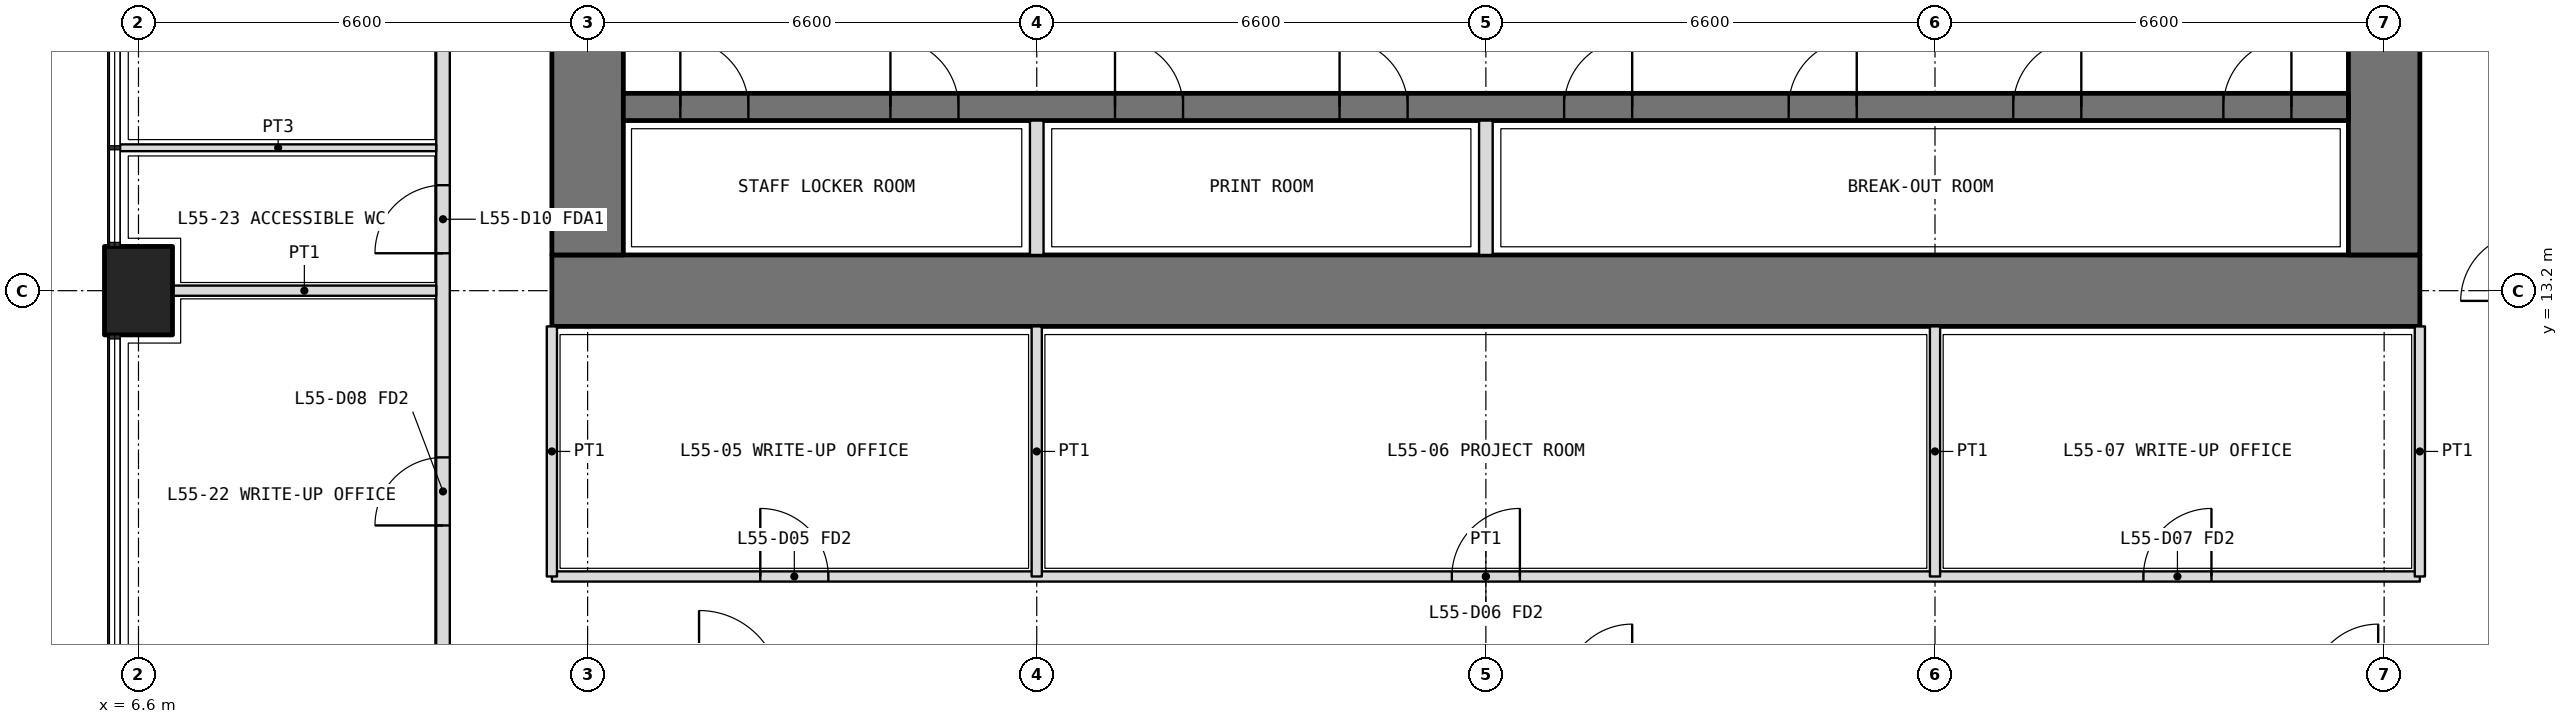
"""IFC4 building model, lengths in metres.
Left out: names, types, materials, properties, quantities, classifications, styles, units other than length and angle.
Written with IfcOpenShell. Run it as: python <this file> out.ifc"""

import sys

from ifc_helpers import new_model, si_unit, direction, frame, frame_2d, origin, origin_2d, place, context, subcontext, project, spatial, rectangle, extrude, element, fill, save


model = new_model("IFC4")
c1 = context("Model", 3, precision=1e-05, world=origin(), true_north=direction((0.0, 1.0)))
c2 = subcontext(c1, "Body", "Model", "MODEL_VIEW")
j1 = project(units=[si_unit("LENGTHUNIT", "METRE"), si_unit("PLANEANGLEUNIT", "RADIAN")], contexts=[c1])
p1 = place(None, origin())
s1 = spatial("IfcSite", under=j1, at=p1, CompositionType="ELEMENT")
p2 = place(p1, origin())
s2 = spatial("IfcBuilding", under=s1, at=p2, CompositionType="ELEMENT")
p3 = place(p2, frame((0.0, 0.0, 241.8)))
s3 = spatial("IfcBuildingStorey", under=s2, at=p3, CompositionType="ELEMENT", Elevation=241.8)
p4 = place(p3, frame((6.6, 13.2, 0.0), z_axis=(0.0, 0.0, 1.0), x_axis=(0.0, 1.0, 0.0)))
e1 = element("IfcColumn", 1, at=p4, inside=s3, PredefinedType="COLUMN", context=c2, shape_type="SweptSolid", body=[
    extrude(rectangle(XDim=1.3, YDim=1.0, at=origin_2d()), origin(), (0.0, 0.0, 1.0), 4.2),
])
p5 = place(p3, frame((12.675, 13.2, 0.0), z_axis=(0.0, 0.0, 1.0), x_axis=(1.0, 0.0, 0.0)))
e2 = element("IfcWall", 2, at=p5, inside=s3, PredefinedType="SHEAR", context=c2, shape_type="SweptSolid", body=[
    extrude(rectangle(XDim=27.45, YDim=1.05, at=frame_2d((13.725, 0.0))), origin(), (0.0, 0.0, 1.0), 4.2),
])
p6 = place(p3, frame((39.6, 13.725, 0.0), z_axis=(0.0, 0.0, 1.0), x_axis=(0.0, 1.0, 0.0)))
e3 = element("IfcWall", 3, at=p6, inside=s3, PredefinedType="SHEAR", context=c2, shape_type="SweptSolid", body=[
    extrude(rectangle(XDim=18.75, YDim=1.05, at=frame_2d((9.375, 0.0))), origin(), (0.0, 0.0, 1.0), 4.2),
])
p7 = place(p6, frame((3.025, 0.0, 0.0)))
e4 = element("IfcOpeningElement", 4, at=p7, cuts=e3, PredefinedType="OPENING", context=c2, shape_type="SweptSolid", body=[
    extrude(rectangle(XDim=1.6, YDim=2.1, at=frame_2d((0.8, 1.05))), frame((0.0, 0.535, 0.0), z_axis=(0.0, -1.0, 0.0), x_axis=(1.0, 0.0, 0.0)), (0.0, 0.0, 1.0), 1.07),
])
p8 = place(p6, frame((13.825, 0.0, 0.0)))
e5 = element("IfcOpeningElement", 5, at=p8, cuts=e3, PredefinedType="OPENING", context=c2, shape_type="SweptSolid", body=[
    extrude(rectangle(XDim=1.6, YDim=2.1, at=frame_2d((0.8, 1.05))), frame((0.0, 0.535, 0.0), z_axis=(0.0, -1.0, 0.0), x_axis=(1.0, 0.0, 0.0)), (0.0, 0.0, 1.0), 1.07),
])
p9 = place(p3, frame((13.2, 32.475, 0.0), z_axis=(0.0, 0.0, 1.0), x_axis=(0.0, -1.0, 0.0)))
e6 = element("IfcWall", 6, at=p9, inside=s3, PredefinedType="SHEAR", context=c2, shape_type="SweptSolid", body=[
    extrude(rectangle(XDim=18.75, YDim=1.05, at=frame_2d((9.375, 0.0))), origin(), (0.0, 0.0, 1.0), 4.2),
])
p10 = place(p9, frame((14.125, 0.0, 0.0)))
e7 = element("IfcOpeningElement", 7, at=p10, cuts=e6, PredefinedType="OPENING", context=c2, shape_type="SweptSolid", body=[
    extrude(rectangle(XDim=1.6, YDim=2.1, at=frame_2d((0.8, 1.05))), frame((0.0, 0.535, 0.0), z_axis=(0.0, -1.0, 0.0), x_axis=(1.0, 0.0, 0.0)), (0.0, 0.0, 1.0), 1.07),
])
p11 = place(p9, frame((3.325, 0.0, 0.0)))
e8 = element("IfcOpeningElement", 8, at=p11, cuts=e6, PredefinedType="OPENING", context=c2, shape_type="SweptSolid", body=[
    extrude(rectangle(XDim=1.6, YDim=2.1, at=frame_2d((0.8, 1.05))), frame((0.0, 0.535, 0.0), z_axis=(0.0, -1.0, 0.0), x_axis=(1.0, 0.0, 0.0)), (0.0, 0.0, 1.0), 1.07),
])
p12 = place(p3, frame((13.725, 15.9, 0.0), z_axis=(0.0, 0.0, 1.0), x_axis=(1.0, 0.0, 0.0)))
e9 = element("IfcWall", 9, at=p12, inside=s3, PredefinedType="SHEAR", context=c2, shape_type="SweptSolid", body=[
    extrude(rectangle(XDim=25.35, YDim=0.4, at=frame_2d((12.675, 0.0))), origin(), (0.0, 0.0, 1.0), 4.2),
])
p13 = place(p12, frame((0.837, 0.0, 0.0)))
e10 = element("IfcOpeningElement", 10, at=p13, cuts=e9, PredefinedType="OPENING", context=c2, shape_type="SweptSolid", body=[
    extrude(rectangle(XDim=1.0, YDim=2.1, at=frame_2d((0.5, 1.05))), frame((0.0, 0.21, 0.0), z_axis=(0.0, -1.0, 0.0), x_axis=(1.0, 0.0, 0.0)), (0.0, 0.0, 1.0), 0.42),
])
p14 = place(p12, frame((3.925, 0.0, 0.0)))
e11 = element("IfcOpeningElement", 11, at=p14, cuts=e9, PredefinedType="OPENING", context=c2, shape_type="SweptSolid", body=[
    extrude(rectangle(XDim=1.0, YDim=2.1, at=frame_2d((0.5, 1.05))), frame((0.0, 0.21, 0.0), z_axis=(0.0, -1.0, 0.0), x_axis=(1.0, 0.0, 0.0)), (0.0, 0.0, 1.0), 0.42),
])
p15 = place(p12, frame((7.225, 0.0, 0.0)))
e12 = element("IfcOpeningElement", 12, at=p15, cuts=e9, PredefinedType="OPENING", context=c2, shape_type="SweptSolid", body=[
    extrude(rectangle(XDim=1.0, YDim=2.1, at=frame_2d((0.5, 1.05))), frame((0.0, 0.21, 0.0), z_axis=(0.0, -1.0, 0.0), x_axis=(1.0, 0.0, 0.0)), (0.0, 0.0, 1.0), 0.42),
])
p16 = place(p12, frame((10.525, 0.0, 0.0)))
e13 = element("IfcOpeningElement", 13, at=p16, cuts=e9, PredefinedType="OPENING", context=c2, shape_type="SweptSolid", body=[
    extrude(rectangle(XDim=1.0, YDim=2.1, at=frame_2d((0.5, 1.05))), frame((0.0, 0.21, 0.0), z_axis=(0.0, -1.0, 0.0), x_axis=(1.0, 0.0, 0.0)), (0.0, 0.0, 1.0), 0.42),
])
p17 = place(p12, frame((13.825, 0.0, 0.0)))
e14 = element("IfcOpeningElement", 14, at=p17, cuts=e9, PredefinedType="OPENING", context=c2, shape_type="SweptSolid", body=[
    extrude(rectangle(XDim=1.0, YDim=2.1, at=frame_2d((0.5, 1.05))), frame((0.0, 0.21, 0.0), z_axis=(0.0, -1.0, 0.0), x_axis=(1.0, 0.0, 0.0)), (0.0, 0.0, 1.0), 0.42),
])
p18 = place(p12, frame((17.125, 0.0, 0.0)))
e15 = element("IfcOpeningElement", 15, at=p18, cuts=e9, PredefinedType="OPENING", context=c2, shape_type="SweptSolid", body=[
    extrude(rectangle(XDim=1.0, YDim=2.1, at=frame_2d((0.5, 1.05))), frame((0.0, 0.21, 0.0), z_axis=(0.0, -1.0, 0.0), x_axis=(1.0, 0.0, 0.0)), (0.0, 0.0, 1.0), 0.42),
])
p19 = place(p12, frame((20.425, 0.0, 0.0)))
e16 = element("IfcOpeningElement", 16, at=p19, cuts=e9, PredefinedType="OPENING", context=c2, shape_type="SweptSolid", body=[
    extrude(rectangle(XDim=1.0, YDim=2.1, at=frame_2d((0.5, 1.05))), frame((0.0, 0.21, 0.0), z_axis=(0.0, -1.0, 0.0), x_axis=(1.0, 0.0, 0.0)), (0.0, 0.0, 1.0), 0.42),
])
p20 = place(p12, frame((23.512, 0.0, 0.0)))
e17 = element("IfcOpeningElement", 17, at=p20, cuts=e9, PredefinedType="OPENING", context=c2, shape_type="SweptSolid", body=[
    extrude(rectangle(XDim=1.0, YDim=2.1, at=frame_2d((0.5, 1.05))), frame((0.0, 0.21, 0.0), z_axis=(0.0, -1.0, 0.0), x_axis=(1.0, 0.0, 0.0)), (0.0, 0.0, 1.0), 0.42),
])
for number, where, z_axis, x_axis in (
    (18, (19.8, 13.725, 0.0), (0.0, 0.0, 1.0), (0.0, 1.0, 0.0)),
    (19, (26.4, 13.725, 0.0), (0.0, 0.0, 1.0), (0.0, 1.0, 0.0)),
):
    element("IfcWall", number, at=place(p3, frame(where, z_axis=z_axis, x_axis=x_axis)), inside=s3, PredefinedType="PARTITIONING", context=c2, shape_type="SweptSolid", body=[
        extrude(rectangle(XDim=1.975, YDim=0.2, at=frame_2d((0.987, 0.0))), origin(), (0.0, 0.0, 1.0), 4.2),
    ])
p21 = place(p3, frame((12.675, 9.0, 0.0), z_axis=(0.0, 0.0, 1.0), x_axis=(1.0, 0.0, 0.0)))
e20 = element("IfcWall", 20, at=p21, inside=s3, PredefinedType="PARTITIONING", context=c2, shape_type="SweptSolid", body=[
    extrude(rectangle(XDim=27.45, YDim=0.15, at=frame_2d((13.725, 0.0))), origin(), (0.0, 0.0, 1.0), 3.0),
])
p22 = place(p21, frame((3.062, 0.0, 0.0)))
e21 = element("IfcOpeningElement", 21, at=p22, cuts=e20, PredefinedType="OPENING", context=c2, shape_type="SweptSolid", body=[
    extrude(rectangle(XDim=1.0, YDim=2.1, at=frame_2d((0.5, 1.05))), frame((0.0, 0.085, 0.0), z_axis=(0.0, -1.0, 0.0), x_axis=(1.0, 0.0, 0.0)), (0.0, 0.0, 1.0), 0.17),
])
p23 = place(p21, frame((13.225, 0.0, 0.0)))
e22 = element("IfcOpeningElement", 22, at=p23, cuts=e20, PredefinedType="OPENING", context=c2, shape_type="SweptSolid", body=[
    extrude(rectangle(XDim=1.0, YDim=2.1, at=frame_2d((0.5, 1.05))), frame((0.0, 0.085, 0.0), z_axis=(0.0, -1.0, 0.0), x_axis=(1.0, 0.0, 0.0)), (0.0, 0.0, 1.0), 0.17),
])
p24 = place(p21, frame((23.387, 0.0, 0.0)))
e23 = element("IfcOpeningElement", 23, at=p24, cuts=e20, PredefinedType="OPENING", context=c2, shape_type="SweptSolid", body=[
    extrude(rectangle(XDim=1.0, YDim=2.1, at=frame_2d((0.5, 1.05))), frame((0.0, 0.085, 0.0), z_axis=(0.0, -1.0, 0.0), x_axis=(1.0, 0.0, 0.0)), (0.0, 0.0, 1.0), 0.17),
])
for number, where, z_axis, x_axis in (
    (24, (12.675, 12.675, 0.0), (0.0, 0.0, 1.0), (0.0, -1.0, 0.0)),
    (25, (40.125, 12.675, 0.0), (0.0, 0.0, 1.0), (0.0, -1.0, 0.0)),
    (26, (19.8, 12.675, 0.0), (0.0, 0.0, 1.0), (0.0, -1.0, 0.0)),
    (27, (33.0, 12.675, 0.0), (0.0, 0.0, 1.0), (0.0, -1.0, 0.0)),
):
    element("IfcWall", number, at=place(p3, frame(where, z_axis=z_axis, x_axis=x_axis)), inside=s3, PredefinedType="PARTITIONING", context=c2, shape_type="SweptSolid", body=[
        extrude(rectangle(XDim=3.675, YDim=0.15, at=frame_2d((1.837, 0.0))), origin(), (0.0, 0.0, 1.0), 3.0),
    ])
p25 = place(p3, frame((11.075, 7.4, 0.0), z_axis=(0.0, 0.0, 1.0), x_axis=(0.0, 1.0, 0.0)))
e28 = element("IfcWall", 28, at=p25, inside=s3, PredefinedType="PARTITIONING", context=c2, shape_type="SweptSolid", body=[
    extrude(rectangle(XDim=31.4, YDim=0.2, at=frame_2d((15.7, 0.0))), origin(), (0.0, 0.0, 1.0), 3.0),
])
p26 = place(p25, frame((2.35, 0.0, 0.0)))
e29 = element("IfcOpeningElement", 29, at=p26, cuts=e28, PredefinedType="OPENING", context=c2, shape_type="SweptSolid", body=[
    extrude(rectangle(XDim=1.0, YDim=2.1, at=frame_2d((0.5, 1.05))), frame((0.0, 0.11, 0.0), z_axis=(0.0, -1.0, 0.0), x_axis=(1.0, 0.0, 0.0)), (0.0, 0.0, 1.0), 0.22),
])
p27 = place(p25, frame((6.35, 0.0, 0.0)))
e30 = element("IfcOpeningElement", 30, at=p27, cuts=e28, PredefinedType="OPENING", context=c2, shape_type="SweptSolid", body=[
    extrude(rectangle(XDim=1.0, YDim=2.1, at=frame_2d((0.5, 1.05))), frame((0.0, 0.11, 0.0), z_axis=(0.0, -1.0, 0.0), x_axis=(1.0, 0.0, 0.0)), (0.0, 0.0, 1.0), 0.22),
])
p28 = place(p25, frame((9.45, 0.0, 0.0)))
e31 = element("IfcOpeningElement", 31, at=p28, cuts=e28, PredefinedType="OPENING", context=c2, shape_type="SweptSolid", body=[
    extrude(rectangle(XDim=0.9, YDim=2.1, at=frame_2d((0.45, 1.05))), frame((0.0, 0.11, 0.0), z_axis=(0.0, -1.0, 0.0), x_axis=(1.0, 0.0, 0.0)), (0.0, 0.0, 1.0), 0.22),
])
p29 = place(p25, frame((13.35, 0.0, 0.0)))
e32 = element("IfcOpeningElement", 32, at=p29, cuts=e28, PredefinedType="OPENING", context=c2, shape_type="SweptSolid", body=[
    extrude(rectangle(XDim=0.9, YDim=2.1, at=frame_2d((0.45, 1.05))), frame((0.0, 0.11, 0.0), z_axis=(0.0, -1.0, 0.0), x_axis=(1.0, 0.0, 0.0)), (0.0, 0.0, 1.0), 0.22),
])
p30 = place(p25, frame((20.15, 0.0, 0.0)))
e33 = element("IfcOpeningElement", 33, at=p30, cuts=e28, PredefinedType="OPENING", context=c2, shape_type="SweptSolid", body=[
    extrude(rectangle(XDim=1.0, YDim=2.1, at=frame_2d((0.5, 1.05))), frame((0.0, 0.11, 0.0), z_axis=(0.0, -1.0, 0.0), x_axis=(1.0, 0.0, 0.0)), (0.0, 0.0, 1.0), 0.22),
])
p31 = place(p25, frame((28.05, 0.0, 0.0)))
e34 = element("IfcOpeningElement", 34, at=p31, cuts=e28, PredefinedType="OPENING", context=c2, shape_type="SweptSolid", body=[
    extrude(rectangle(XDim=1.0, YDim=2.1, at=frame_2d((0.5, 1.05))), frame((0.0, 0.11, 0.0), z_axis=(0.0, -1.0, 0.0), x_axis=(1.0, 0.0, 0.0)), (0.0, 0.0, 1.0), 0.22),
])
p32 = place(p3, frame((6.33, 15.3, 0.0), z_axis=(0.0, 0.0, 1.0), x_axis=(1.0, 0.0, 0.0)))
e35 = element("IfcWall", 35, at=p32, inside=s3, PredefinedType="PARTITIONING", context=c2, shape_type="SweptSolid", body=[
    extrude(rectangle(XDim=4.645, YDim=0.1, at=frame_2d((2.323, 0.0))), origin(), (0.0, 0.0, 1.0), 2.7),
])
p33 = place(p3, frame((7.1, 13.2, 0.0), z_axis=(0.0, 0.0, 1.0), x_axis=(1.0, 0.0, 0.0)))
e36 = element("IfcWall", 36, at=p33, inside=s3, PredefinedType="PARTITIONING", context=c2, shape_type="SweptSolid", body=[
    extrude(rectangle(XDim=3.875, YDim=0.15, at=frame_2d((1.938, 0.0))), origin(), (0.0, 0.0, 1.0), 3.0),
])
p34 = place(p22, origin())
e37 = element("IfcDoor", 37, at=p34, inside=s3, OperationType="SINGLE_SWING_LEFT", PredefinedType="DOOR", context=c2, shape_type="SweptSolid", body=[
    extrude(rectangle(XDim=1.0, YDim=2.1, at=frame_2d((0.5, 1.05))), frame((0.0, 0.025, 0.0), z_axis=(0.0, -1.0, 0.0), x_axis=(1.0, 0.0, 0.0)), (0.0, 0.0, 1.0), 0.05),
])
fill(e21, e37)
p35 = place(p23, origin())
e38 = element("IfcDoor", 38, at=p35, inside=s3, OperationType="SINGLE_SWING_RIGHT", PredefinedType="DOOR", context=c2, shape_type="SweptSolid", body=[
    extrude(rectangle(XDim=1.0, YDim=2.1, at=frame_2d((0.5, 1.05))), frame((0.0, 0.025, 0.0), z_axis=(0.0, -1.0, 0.0), x_axis=(1.0, 0.0, 0.0)), (0.0, 0.0, 1.0), 0.05),
])
fill(e22, e38)
p36 = place(p24, origin())
e39 = element("IfcDoor", 39, at=p36, inside=s3, OperationType="SINGLE_SWING_RIGHT", PredefinedType="DOOR", context=c2, shape_type="SweptSolid", body=[
    extrude(rectangle(XDim=1.0, YDim=2.1, at=frame_2d((0.5, 1.05))), frame((0.0, 0.025, 0.0), z_axis=(0.0, -1.0, 0.0), x_axis=(1.0, 0.0, 0.0)), (0.0, 0.0, 1.0), 0.05),
])
fill(e23, e39)
p37 = place(p26, origin())
e40 = element("IfcDoor", 40, at=p37, inside=s3, OperationType="SINGLE_SWING_LEFT", PredefinedType="DOOR", context=c2, shape_type="SweptSolid", body=[
    extrude(rectangle(XDim=1.0, YDim=2.1, at=frame_2d((0.5, 1.05))), frame((0.0, 0.025, 0.0), z_axis=(0.0, -1.0, 0.0), x_axis=(1.0, 0.0, 0.0)), (0.0, 0.0, 1.0), 0.05),
])
fill(e29, e40)
p38 = place(p27, origin())
e41 = element("IfcDoor", 41, at=p38, inside=s3, OperationType="SINGLE_SWING_LEFT", PredefinedType="DOOR", context=c2, shape_type="SweptSolid", body=[
    extrude(rectangle(XDim=1.0, YDim=2.1, at=frame_2d((0.5, 1.05))), frame((0.0, 0.025, 0.0), z_axis=(0.0, -1.0, 0.0), x_axis=(1.0, 0.0, 0.0)), (0.0, 0.0, 1.0), 0.05),
])
fill(e30, e41)
p39 = place(p13, origin())
e42 = element("IfcDoor", 42, at=p39, inside=s3, OperationType="SINGLE_SWING_LEFT", PredefinedType="DOOR", context=c2, shape_type="SweptSolid", body=[
    extrude(rectangle(XDim=1.0, YDim=2.1, at=frame_2d((0.5, 1.05))), frame((0.0, 0.025, 0.0), z_axis=(0.0, -1.0, 0.0), x_axis=(1.0, 0.0, 0.0)), (0.0, 0.0, 1.0), 0.05),
])
fill(e10, e42)
p40 = place(p14, origin())
e43 = element("IfcDoor", 43, at=p40, inside=s3, OperationType="SINGLE_SWING_LEFT", PredefinedType="DOOR", context=c2, shape_type="SweptSolid", body=[
    extrude(rectangle(XDim=1.0, YDim=2.1, at=frame_2d((0.5, 1.05))), frame((0.0, 0.025, 0.0), z_axis=(0.0, -1.0, 0.0), x_axis=(1.0, 0.0, 0.0)), (0.0, 0.0, 1.0), 0.05),
])
fill(e11, e43)
p41 = place(p15, origin())
e44 = element("IfcDoor", 44, at=p41, inside=s3, OperationType="SINGLE_SWING_LEFT", PredefinedType="DOOR", context=c2, shape_type="SweptSolid", body=[
    extrude(rectangle(XDim=1.0, YDim=2.1, at=frame_2d((0.5, 1.05))), frame((0.0, 0.025, 0.0), z_axis=(0.0, -1.0, 0.0), x_axis=(1.0, 0.0, 0.0)), (0.0, 0.0, 1.0), 0.05),
])
fill(e12, e44)
p42 = place(p16, origin())
e45 = element("IfcDoor", 45, at=p42, inside=s3, OperationType="SINGLE_SWING_LEFT", PredefinedType="DOOR", context=c2, shape_type="SweptSolid", body=[
    extrude(rectangle(XDim=1.0, YDim=2.1, at=frame_2d((0.5, 1.05))), frame((0.0, 0.025, 0.0), z_axis=(0.0, -1.0, 0.0), x_axis=(1.0, 0.0, 0.0)), (0.0, 0.0, 1.0), 0.05),
])
fill(e13, e45)
p43 = place(p17, origin())
e46 = element("IfcDoor", 46, at=p43, inside=s3, OperationType="SINGLE_SWING_RIGHT", PredefinedType="DOOR", context=c2, shape_type="SweptSolid", body=[
    extrude(rectangle(XDim=1.0, YDim=2.1, at=frame_2d((0.5, 1.05))), frame((0.0, 0.025, 0.0), z_axis=(0.0, -1.0, 0.0), x_axis=(1.0, 0.0, 0.0)), (0.0, 0.0, 1.0), 0.05),
])
fill(e14, e46)
p44 = place(p18, origin())
e47 = element("IfcDoor", 47, at=p44, inside=s3, OperationType="SINGLE_SWING_RIGHT", PredefinedType="DOOR", context=c2, shape_type="SweptSolid", body=[
    extrude(rectangle(XDim=1.0, YDim=2.1, at=frame_2d((0.5, 1.05))), frame((0.0, 0.025, 0.0), z_axis=(0.0, -1.0, 0.0), x_axis=(1.0, 0.0, 0.0)), (0.0, 0.0, 1.0), 0.05),
])
fill(e15, e47)
p45 = place(p19, origin())
e48 = element("IfcDoor", 48, at=p45, inside=s3, OperationType="SINGLE_SWING_RIGHT", PredefinedType="DOOR", context=c2, shape_type="SweptSolid", body=[
    extrude(rectangle(XDim=1.0, YDim=2.1, at=frame_2d((0.5, 1.05))), frame((0.0, 0.025, 0.0), z_axis=(0.0, -1.0, 0.0), x_axis=(1.0, 0.0, 0.0)), (0.0, 0.0, 1.0), 0.05),
])
fill(e16, e48)
p46 = place(p20, origin())
e49 = element("IfcDoor", 49, at=p46, inside=s3, OperationType="SINGLE_SWING_RIGHT", PredefinedType="DOOR", context=c2, shape_type="SweptSolid", body=[
    extrude(rectangle(XDim=1.0, YDim=2.1, at=frame_2d((0.5, 1.05))), frame((0.0, 0.025, 0.0), z_axis=(0.0, -1.0, 0.0), x_axis=(1.0, 0.0, 0.0)), (0.0, 0.0, 1.0), 0.05),
])
fill(e17, e49)
save(model, sys.argv[1])
